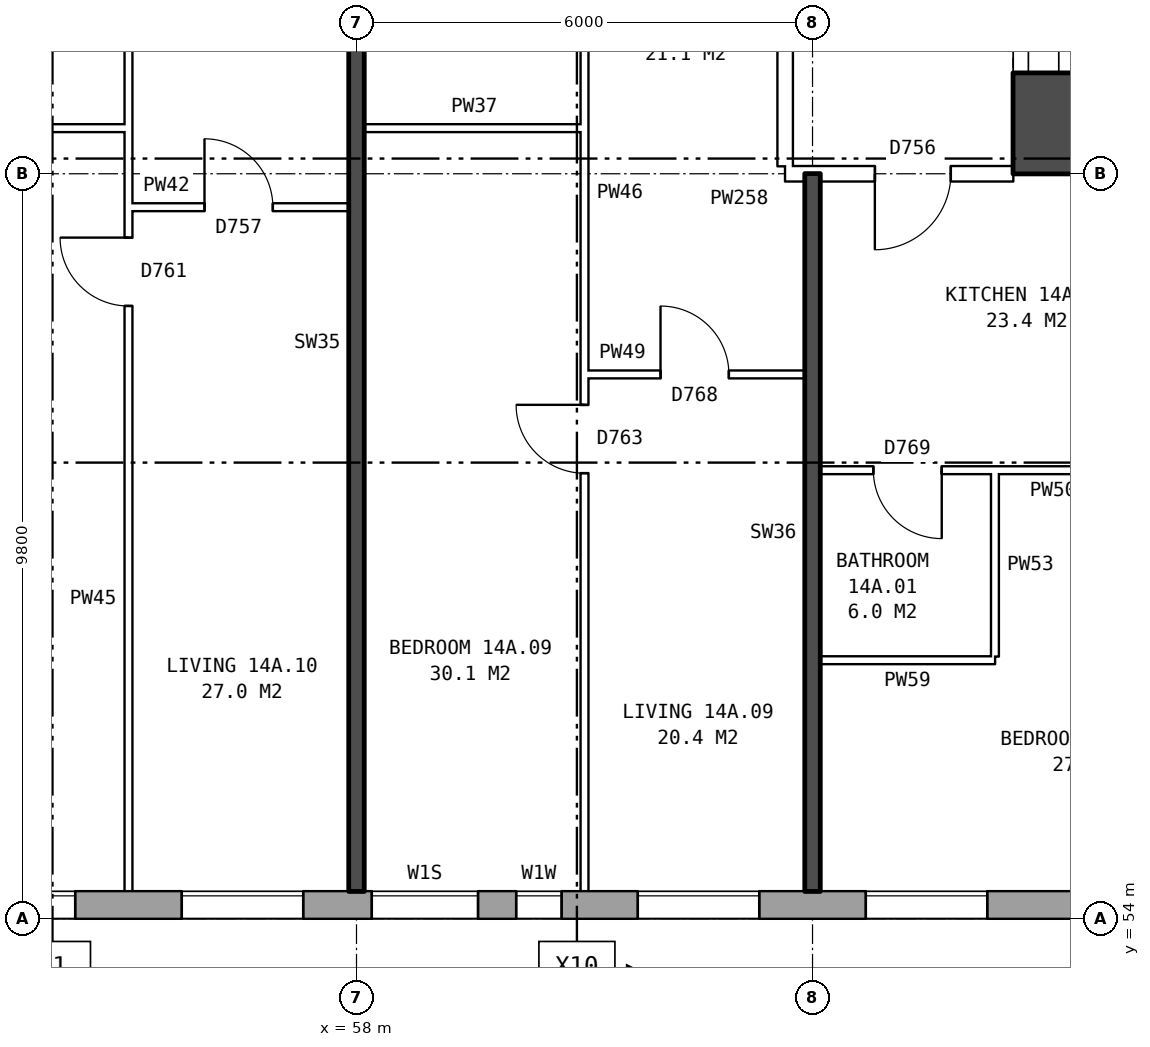
"""IFC4 building model, lengths in metres.
Left out: names, types, materials, properties, quantities, classifications, styles, units other than length and angle.
Written with IfcOpenShell. Run it as: python <this file> out.ifc"""

import sys

from ifc_helpers import new_model, si_unit, direction, frame, frame_2d, origin, place, context, subcontext, project, spatial, rectangle, extrude, element, fill, save


model = new_model("IFC4")
c1 = context("Model", 3, precision=1e-05, world=origin(), true_north=direction((0.0, 1.0)))
c2 = subcontext(c1, "Body", "Model", "MODEL_VIEW")
j1 = project(units=[si_unit("LENGTHUNIT", "METRE"), si_unit("PLANEANGLEUNIT", "RADIAN")], contexts=[c1])
p1 = place(None, origin())
s1 = spatial("IfcSite", under=j1, at=p1, CompositionType="ELEMENT")
p2 = place(p1, origin())
s2 = spatial("IfcBuilding", under=s1, at=p2, CompositionType="ELEMENT")
p3 = place(p2, frame((0.0, 0.0, 53.6)))
s3 = spatial("IfcBuildingStorey", under=s2, at=p3, CompositionType="ELEMENT", Elevation=53.6)
p4 = place(p3, frame((24.575, 54.18, 0.0), z_axis=(0.0, 0.0, 1.0), x_axis=(1.0, 0.0, 0.0)))
e1 = element("IfcWall", 1, at=p4, inside=s3, PredefinedType="STANDARD", context=c2, shape_type="SweptSolid", body=[
    extrude(rectangle(XDim=48.351, YDim=0.36, at=frame_2d((24.175, 0.0))), origin(), (0.0, 0.0, 1.0), 2.85),
])
p5 = place(p4, frame((1.125, 0.0, 0.8)))
e2 = element("IfcOpeningElement", 2, at=p5, cuts=e1, PredefinedType="OPENING", context=c2, shape_type="SweptSolid", body=[
    extrude(rectangle(XDim=1.6, YDim=1.8, at=frame_2d((0.8, 0.9))), frame((0.0, 0.19, 0.0), z_axis=(0.0, -1.0, 0.0), x_axis=(1.0, 0.0, 0.0)), (0.0, 0.0, 1.0), 0.38),
])
p6 = place(p4, frame((4.125, 0.0, 0.8)))
e3 = element("IfcOpeningElement", 3, at=p6, cuts=e1, PredefinedType="OPENING", context=c2, shape_type="SweptSolid", body=[
    extrude(rectangle(XDim=1.6, YDim=1.8, at=frame_2d((0.8, 0.9))), frame((0.0, 0.19, 0.0), z_axis=(0.0, -1.0, 0.0), x_axis=(1.0, 0.0, 0.0)), (0.0, 0.0, 1.0), 0.38),
])
p7 = place(p4, frame((7.125, 0.0, 0.8)))
e4 = element("IfcOpeningElement", 4, at=p7, cuts=e1, PredefinedType="OPENING", context=c2, shape_type="SweptSolid", body=[
    extrude(rectangle(XDim=1.6, YDim=1.8, at=frame_2d((0.8, 0.9))), frame((0.0, 0.19, 0.0), z_axis=(0.0, -1.0, 0.0), x_axis=(1.0, 0.0, 0.0)), (0.0, 0.0, 1.0), 0.38),
])
p8 = place(p4, frame((10.125, 0.0, 0.8)))
e5 = element("IfcOpeningElement", 5, at=p8, cuts=e1, PredefinedType="OPENING", context=c2, shape_type="SweptSolid", body=[
    extrude(rectangle(XDim=1.6, YDim=1.8, at=frame_2d((0.8, 0.9))), frame((0.0, 0.19, 0.0), z_axis=(0.0, -1.0, 0.0), x_axis=(1.0, 0.0, 0.0)), (0.0, 0.0, 1.0), 0.38),
])
p9 = place(p4, frame((12.025, 0.0, 1.7)))
e6 = element("IfcOpeningElement", 6, at=p9, cuts=e1, PredefinedType="OPENING", context=c2, shape_type="SweptSolid", body=[
    extrude(rectangle(XDim=0.8, YDim=0.9, at=frame_2d((0.4, 0.45))), frame((0.0, 0.19, 0.0), z_axis=(0.0, -1.0, 0.0), x_axis=(1.0, 0.0, 0.0)), (0.0, 0.0, 1.0), 0.38),
])
p10 = place(p4, frame((16.125, 0.0, 0.8)))
e7 = element("IfcOpeningElement", 7, at=p10, cuts=e1, PredefinedType="OPENING", context=c2, shape_type="SweptSolid", body=[
    extrude(rectangle(XDim=1.6, YDim=1.8, at=frame_2d((0.8, 0.9))), frame((0.0, 0.19, 0.0), z_axis=(0.0, -1.0, 0.0), x_axis=(1.0, 0.0, 0.0)), (0.0, 0.0, 1.0), 0.38),
])
p11 = place(p4, frame((19.125, 0.0, 0.8)))
e8 = element("IfcOpeningElement", 8, at=p11, cuts=e1, PredefinedType="OPENING", context=c2, shape_type="SweptSolid", body=[
    extrude(rectangle(XDim=1.6, YDim=1.8, at=frame_2d((0.8, 0.9))), frame((0.0, 0.19, 0.0), z_axis=(0.0, -1.0, 0.0), x_axis=(1.0, 0.0, 0.0)), (0.0, 0.0, 1.0), 0.38),
])
p12 = place(p4, frame((22.125, 0.0, 0.8)))
e9 = element("IfcOpeningElement", 9, at=p12, cuts=e1, PredefinedType="OPENING", context=c2, shape_type="SweptSolid", body=[
    extrude(rectangle(XDim=1.6, YDim=1.8, at=frame_2d((0.8, 0.9))), frame((0.0, 0.19, 0.0), z_axis=(0.0, -1.0, 0.0), x_axis=(1.0, 0.0, 0.0)), (0.0, 0.0, 1.0), 0.38),
])
p13 = place(p4, frame((25.125, 0.0, 0.8)))
e10 = element("IfcOpeningElement", 10, at=p13, cuts=e1, PredefinedType="OPENING", context=c2, shape_type="SweptSolid", body=[
    extrude(rectangle(XDim=1.6, YDim=1.8, at=frame_2d((0.8, 0.9))), frame((0.0, 0.19, 0.0), z_axis=(0.0, -1.0, 0.0), x_axis=(1.0, 0.0, 0.0)), (0.0, 0.0, 1.0), 0.38),
])
p14 = place(p4, frame((28.125, 0.0, 0.8)))
e11 = element("IfcOpeningElement", 11, at=p14, cuts=e1, PredefinedType="OPENING", context=c2, shape_type="SweptSolid", body=[
    extrude(rectangle(XDim=1.6, YDim=1.8, at=frame_2d((0.8, 0.9))), frame((0.0, 0.19, 0.0), z_axis=(0.0, -1.0, 0.0), x_axis=(1.0, 0.0, 0.0)), (0.0, 0.0, 1.0), 0.38),
])
p15 = place(p4, frame((31.125, 0.0, 0.8)))
e12 = element("IfcOpeningElement", 12, at=p15, cuts=e1, PredefinedType="OPENING", context=c2, shape_type="SweptSolid", body=[
    extrude(rectangle(XDim=1.6, YDim=1.8, at=frame_2d((0.8, 0.9))), frame((0.0, 0.19, 0.0), z_axis=(0.0, -1.0, 0.0), x_axis=(1.0, 0.0, 0.0)), (0.0, 0.0, 1.0), 0.38),
])
p16 = place(p4, frame((33.625, 0.0, 0.15)))
e13 = element("IfcOpeningElement", 13, at=p16, cuts=e1, PredefinedType="OPENING", context=c2, shape_type="SweptSolid", body=[
    extrude(rectangle(XDim=1.4, YDim=0.9, at=frame_2d((0.7, 0.45))), frame((0.0, 0.19, 0.0), z_axis=(0.0, -1.0, 0.0), x_axis=(1.0, 0.0, 0.0)), (0.0, 0.0, 1.0), 0.38),
])
p17 = place(p4, frame((37.125, 0.0, 0.8)))
e14 = element("IfcOpeningElement", 14, at=p17, cuts=e1, PredefinedType="OPENING", context=c2, shape_type="SweptSolid", body=[
    extrude(rectangle(XDim=1.6, YDim=1.8, at=frame_2d((0.8, 0.9))), frame((0.0, 0.19, 0.0), z_axis=(0.0, -1.0, 0.0), x_axis=(1.0, 0.0, 0.0)), (0.0, 0.0, 1.0), 0.38),
])
p18 = place(p4, frame((40.125, 0.0, 0.8)))
e15 = element("IfcOpeningElement", 15, at=p18, cuts=e1, PredefinedType="OPENING", context=c2, shape_type="SweptSolid", body=[
    extrude(rectangle(XDim=1.6, YDim=1.8, at=frame_2d((0.8, 0.9))), frame((0.0, 0.19, 0.0), z_axis=(0.0, -1.0, 0.0), x_axis=(1.0, 0.0, 0.0)), (0.0, 0.0, 1.0), 0.38),
])
p19 = place(p4, frame((43.125, 0.0, 0.8)))
e16 = element("IfcOpeningElement", 16, at=p19, cuts=e1, PredefinedType="OPENING", context=c2, shape_type="SweptSolid", body=[
    extrude(rectangle(XDim=1.6, YDim=1.8, at=frame_2d((0.8, 0.9))), frame((0.0, 0.19, 0.0), z_axis=(0.0, -1.0, 0.0), x_axis=(1.0, 0.0, 0.0)), (0.0, 0.0, 1.0), 0.38),
])
p20 = place(p4, frame((46.125, 0.0, 0.8)))
e17 = element("IfcOpeningElement", 17, at=p20, cuts=e1, PredefinedType="OPENING", context=c2, shape_type="SweptSolid", body=[
    extrude(rectangle(XDim=1.6, YDim=1.8, at=frame_2d((0.8, 0.9))), frame((0.0, 0.19, 0.0), z_axis=(0.0, -1.0, 0.0), x_axis=(1.0, 0.0, 0.0)), (0.0, 0.0, 1.0), 0.38),
])
p21 = place(p4, frame((14.325, 0.0, 0.8)))
e18 = element("IfcOpeningElement", 18, at=p21, cuts=e1, PredefinedType="OPENING", context=c2, shape_type="SweptSolid", body=[
    extrude(rectangle(XDim=0.8, YDim=0.9, at=frame_2d((0.4, 0.45))), frame((0.0, 0.19, 0.0), z_axis=(0.0, -1.0, 0.0), x_axis=(1.0, 0.0, 0.0)), (0.0, 0.0, 1.0), 0.38),
])
p22 = place(p4, frame((35.525, 0.0, 1.65)))
e19 = element("IfcOpeningElement", 19, at=p22, cuts=e1, PredefinedType="OPENING", context=c2, shape_type="SweptSolid", body=[
    extrude(rectangle(XDim=0.6, YDim=0.9, at=frame_2d((0.3, 0.45))), frame((0.0, 0.19, 0.0), z_axis=(0.0, -1.0, 0.0), x_axis=(1.0, 0.0, 0.0)), (0.0, 0.0, 1.0), 0.38),
])
p23 = place(p3, frame((67.04, 64.6, 0.0), z_axis=(0.0, 0.0, 1.0), x_axis=(0.0, 1.0, 0.0)))
e20 = element("IfcWall", 20, at=p23, inside=s3, PredefinedType="SHEAR", context=c2, shape_type="SweptSolid", body=[
    extrude(rectangle(XDim=10.8, YDim=0.8, at=frame_2d((5.4, 0.0))), origin(), (0.0, 0.0, 1.0), 2.85),
])
p24 = place(p23, frame((0.525, 0.0, 0.0)))
e21 = element("IfcOpeningElement", 21, at=p24, cuts=e20, PredefinedType="OPENING", context=c2, shape_type="SweptSolid", body=[
    extrude(rectangle(XDim=1.1, YDim=2.1, at=frame_2d((0.55, 1.05))), frame((0.0, 0.41, 0.0), z_axis=(0.0, -1.0, 0.0), x_axis=(1.0, 0.0, 0.0)), (0.0, 0.0, 1.0), 0.82),
])
p25 = place(p23, frame((9.1, 0.0, 0.0)))
e22 = element("IfcOpeningElement", 22, at=p25, cuts=e20, PredefinedType="OPENING", context=c2, shape_type="SweptSolid", body=[
    extrude(rectangle(XDim=1.1, YDim=2.1, at=frame_2d((0.55, 1.05))), frame((0.0, 0.41, 0.0), z_axis=(0.0, -1.0, 0.0), x_axis=(1.0, 0.0, 0.0)), (0.0, 0.0, 1.0), 0.82),
])
p26 = place(p3, frame((66.64, 64.2, 0.0), z_axis=(0.0, 0.0, 1.0), x_axis=(1.0, 0.0, 0.0)))
e23 = element("IfcWall", 23, at=p26, inside=s3, PredefinedType="SHEAR", context=c2, shape_type="SweptSolid", body=[
    extrude(rectangle(XDim=9.0, YDim=0.8, at=frame_2d((4.5, 0.0))), origin(), (0.0, 0.0, 1.0), 2.85),
])
p27 = place(p3, frame((63.64, 63.9, 0.0), z_axis=(0.0, 0.0, 1.0), x_axis=(0.0, 1.0, 0.0)))
e24 = element("IfcWall", 24, at=p27, inside=s3, PredefinedType="PARTITIONING", context=c2, shape_type="SweptSolid", body=[
    extrude(rectangle(XDim=12.2, YDim=0.2, at=frame_2d((6.1, 0.0))), origin(), (0.0, 0.0, 1.0), 2.85),
])
p28 = place(p27, frame((5.1, 0.0, 0.0)))
e25 = element("IfcOpeningElement", 25, at=p28, cuts=e24, PredefinedType="OPENING", context=c2, shape_type="SweptSolid", body=[
    extrude(rectangle(XDim=2.0, YDim=2.1, at=frame_2d((1.0, 1.05))), frame((0.0, 0.11, 0.0), z_axis=(0.0, -1.0, 0.0), x_axis=(1.0, 0.0, 0.0)), (0.0, 0.0, 1.0), 0.22),
])
p29 = place(p3, frame((64.1, 57.4, 0.0), z_axis=(0.0, 0.0, 1.0), x_axis=(1.0, 0.0, 0.0)))
e26 = element("IfcWall", 26, at=p29, inside=s3, PredefinedType="PARTITIONING", context=c2, shape_type="SweptSolid", body=[
    extrude(rectangle(XDim=2.3, YDim=0.1, at=frame_2d((1.15, 0.0))), origin(), (0.0, 0.0, 1.0), 2.85),
])
p30 = place(p3, frame((64.1, 59.9, 0.0), z_axis=(0.0, 0.0, 1.0), x_axis=(1.0, 0.0, 0.0)))
e27 = element("IfcWall", 27, at=p30, inside=s3, PredefinedType="PARTITIONING", context=c2, shape_type="SweptSolid", body=[
    extrude(rectangle(XDim=5.8, YDim=0.1, at=frame_2d((2.9, 0.0))), origin(), (0.0, 0.0, 1.0), 2.85),
])
p31 = place(p30, frame((3.6, 0.0, 0.0)))
e28 = element("IfcOpeningElement", 28, at=p31, cuts=e27, PredefinedType="OPENING", context=c2, shape_type="SweptSolid", body=[
    extrude(rectangle(XDim=0.9, YDim=2.1, at=frame_2d((0.45, 1.05))), frame((0.0, 0.06, 0.0), z_axis=(0.0, -1.0, 0.0), x_axis=(1.0, 0.0, 0.0)), (0.0, 0.0, 1.0), 0.12),
])
p32 = place(p30, frame((0.7, 0.0, 0.0)))
e29 = element("IfcOpeningElement", 29, at=p32, cuts=e27, PredefinedType="OPENING", context=c2, shape_type="SweptSolid", body=[
    extrude(rectangle(XDim=0.9, YDim=2.1, at=frame_2d((0.45, 1.05))), frame((0.0, 0.06, 0.0), z_axis=(0.0, -1.0, 0.0), x_axis=(1.0, 0.0, 0.0)), (0.0, 0.0, 1.0), 0.12),
])
p33 = place(p3, frame((61.0, 61.16, 0.0), z_axis=(0.0, 0.0, 1.0), x_axis=(1.0, 0.0, 0.0)))
e30 = element("IfcWall", 30, at=p33, inside=s3, PredefinedType="PARTITIONING", context=c2, shape_type="SweptSolid", body=[
    extrude(rectangle(XDim=2.9, YDim=0.1, at=frame_2d((1.45, 0.0))), origin(), (0.0, 0.0, 1.0), 2.85),
])
p34 = place(p33, frame((1.0, 0.0, 0.0)))
e31 = element("IfcOpeningElement", 31, at=p34, cuts=e30, PredefinedType="OPENING", context=c2, shape_type="SweptSolid", body=[
    extrude(rectangle(XDim=0.9, YDim=2.1, at=frame_2d((0.45, 1.05))), frame((0.0, 0.06, 0.0), z_axis=(0.0, -1.0, 0.0), x_axis=(1.0, 0.0, 0.0)), (0.0, 0.0, 1.0), 0.12),
])
p35 = place(p3, frame((55.0, 63.36, 0.0), z_axis=(0.0, 0.0, 1.0), x_axis=(1.0, 0.0, 0.0)))
e32 = element("IfcWall", 32, at=p35, inside=s3, PredefinedType="PARTITIONING", context=c2, shape_type="SweptSolid", body=[
    extrude(rectangle(XDim=2.9, YDim=0.1, at=frame_2d((1.45, 0.0))), origin(), (0.0, 0.0, 1.0), 2.85),
])
p36 = place(p35, frame((1.0, 0.0, 0.0)))
e33 = element("IfcOpeningElement", 33, at=p36, cuts=e32, PredefinedType="OPENING", context=c2, shape_type="SweptSolid", body=[
    extrude(rectangle(XDim=0.9, YDim=2.1, at=frame_2d((0.45, 1.05))), frame((0.0, 0.06, 0.0), z_axis=(0.0, -1.0, 0.0), x_axis=(1.0, 0.0, 0.0)), (0.0, 0.0, 1.0), 0.12),
])
p37 = place(p3, frame((63.64, 63.8, 0.0), z_axis=(0.0, 0.0, 1.0), x_axis=(1.0, 0.0, 0.0)))
e34 = element("IfcWall", 34, at=p37, inside=s3, PredefinedType="PARTITIONING", context=c2, shape_type="SweptSolid", body=[
    extrude(rectangle(XDim=3.0, YDim=0.2, at=frame_2d((1.5, 0.0))), origin(), (0.0, 0.0, 1.0), 2.85),
])
p38 = place(p37, frame((1.18, 0.0, 0.0)))
e35 = element("IfcOpeningElement", 35, at=p38, cuts=e34, PredefinedType="OPENING", context=c2, shape_type="SweptSolid", body=[
    extrude(rectangle(XDim=1.0, YDim=2.1, at=frame_2d((0.5, 1.05))), frame((0.0, 0.11, 0.0), z_axis=(0.0, -1.0, 0.0), x_axis=(1.0, 0.0, 0.0)), (0.0, 0.0, 1.0), 0.22),
])
for number, where, z_axis, x_axis in (
    (36, (52.1, 64.4, 0.0), (0.0, 0.0, 1.0), (1.0, 0.0, 0.0)),
    (37, (58.1, 64.4, 0.0), (0.0, 0.0, 1.0), (1.0, 0.0, 0.0)),
):
    element("IfcWall", number, at=place(p3, frame(where, z_axis=z_axis, x_axis=x_axis)), inside=s3, PredefinedType="PARTITIONING", context=c2, shape_type="SweptSolid", body=[
        extrude(rectangle(XDim=2.9, YDim=0.1, at=frame_2d((1.45, 0.0))), origin(), (0.0, 0.0, 1.0), 2.85),
    ])
p39 = place(p3, frame((55.0, 54.36, 0.0), z_axis=(0.0, 0.0, 1.0), x_axis=(0.0, 1.0, 0.0)))
e38 = element("IfcWall", 38, at=p39, inside=s3, PredefinedType="PARTITIONING", context=c2, shape_type="SweptSolid", body=[
    extrude(rectangle(XDim=14.34, YDim=0.1, at=frame_2d((7.17, 0.0))), origin(), (0.0, 0.0, 1.0), 2.85),
])
p40 = place(p39, frame((7.7, 0.0, 0.0)))
e39 = element("IfcOpeningElement", 39, at=p40, cuts=e38, PredefinedType="OPENING", context=c2, shape_type="SweptSolid", body=[
    extrude(rectangle(XDim=0.9, YDim=2.1, at=frame_2d((0.45, 1.05))), frame((0.0, 0.06, 0.0), z_axis=(0.0, -1.0, 0.0), x_axis=(1.0, 0.0, 0.0)), (0.0, 0.0, 1.0), 0.12),
])
p41 = place(p39, frame((13.04, 0.0, 0.0)))
e40 = element("IfcOpeningElement", 40, at=p41, cuts=e38, PredefinedType="OPENING", context=c2, shape_type="SweptSolid", body=[
    extrude(rectangle(XDim=0.9, YDim=2.1, at=frame_2d((0.45, 1.05))), frame((0.0, 0.06, 0.0), z_axis=(0.0, -1.0, 0.0), x_axis=(1.0, 0.0, 0.0)), (0.0, 0.0, 1.0), 0.12),
])
p42 = place(p3, frame((58.0, 54.36, 0.0), z_axis=(0.0, 0.0, 1.0), x_axis=(0.0, 1.0, 0.0)))
e41 = element("IfcWall", 41, at=p42, inside=s3, PredefinedType="SOLIDWALL", context=c2, shape_type="SweptSolid", body=[
    extrude(rectangle(XDim=14.44, YDim=0.2, at=frame_2d((7.22, 0.0))), origin(), (0.0, 0.0, 1.0), 2.85),
])
p43 = place(p3, frame((61.0, 54.36, 0.0), z_axis=(0.0, 0.0, 1.0), x_axis=(0.0, 1.0, 0.0)))
e42 = element("IfcWall", 42, at=p43, inside=s3, PredefinedType="PARTITIONING", context=c2, shape_type="SweptSolid", body=[
    extrude(rectangle(XDim=14.34, YDim=0.1, at=frame_2d((7.17, 0.0))), origin(), (0.0, 0.0, 1.0), 2.85),
])
p44 = place(p43, frame((5.5, 0.0, 0.0)))
e43 = element("IfcOpeningElement", 43, at=p44, cuts=e42, PredefinedType="OPENING", context=c2, shape_type="SweptSolid", body=[
    extrude(rectangle(XDim=0.9, YDim=2.1, at=frame_2d((0.45, 1.05))), frame((0.0, 0.06, 0.0), z_axis=(0.0, -1.0, 0.0), x_axis=(1.0, 0.0, 0.0)), (0.0, 0.0, 1.0), 0.12),
])
p45 = place(p43, frame((12.54, 0.0, 0.0)))
e44 = element("IfcOpeningElement", 44, at=p45, cuts=e42, PredefinedType="OPENING", context=c2, shape_type="SweptSolid", body=[
    extrude(rectangle(XDim=0.9, YDim=2.1, at=frame_2d((0.45, 1.05))), frame((0.0, 0.06, 0.0), z_axis=(0.0, -1.0, 0.0), x_axis=(1.0, 0.0, 0.0)), (0.0, 0.0, 1.0), 0.12),
])
p46 = place(p3, frame((64.0, 54.36, 0.0), z_axis=(0.0, 0.0, 1.0), x_axis=(0.0, 1.0, 0.0)))
e45 = element("IfcWall", 45, at=p46, inside=s3, PredefinedType="SOLIDWALL", context=c2, shape_type="SweptSolid", body=[
    extrude(rectangle(XDim=9.44, YDim=0.2, at=frame_2d((4.72, 0.0))), origin(), (0.0, 0.0, 1.0), 2.85),
])
p47 = place(p3, frame((66.4, 57.45, 0.0), z_axis=(0.0, 0.0, 1.0), x_axis=(0.0, 1.0, 0.0)))
e46 = element("IfcWall", 46, at=p47, inside=s3, PredefinedType="PARTITIONING", context=c2, shape_type="SweptSolid", body=[
    extrude(rectangle(XDim=2.4, YDim=0.1, at=frame_2d((1.2, 0.0))), origin(), (0.0, 0.0, 1.0), 2.85),
])
p48 = place(p14, origin())
e47 = element("IfcWindow", 47, at=p48, inside=s3, PartitioningType="SINGLE_PANEL", PredefinedType="WINDOW", context=c2, shape_type="SweptSolid", body=[
    extrude(rectangle(XDim=1.6, YDim=1.8, at=frame_2d((0.8, 0.9))), frame((0.0, 0.15, 0.0), z_axis=(0.0, -1.0, 0.0), x_axis=(1.0, 0.0, 0.0)), (0.0, 0.0, 1.0), 0.06),
])
fill(e11, e47)
p49 = place(p15, origin())
e48 = element("IfcWindow", 48, at=p49, inside=s3, PartitioningType="SINGLE_PANEL", PredefinedType="WINDOW", context=c2, shape_type="SweptSolid", body=[
    extrude(rectangle(XDim=1.6, YDim=1.8, at=frame_2d((0.8, 0.9))), frame((0.0, 0.15, 0.0), z_axis=(0.0, -1.0, 0.0), x_axis=(1.0, 0.0, 0.0)), (0.0, 0.0, 1.0), 0.06),
])
fill(e12, e48)
p50 = place(p16, origin())
e49 = element("IfcWindow", 49, at=p50, inside=s3, PartitioningType="SINGLE_PANEL", PredefinedType="WINDOW", context=c2, shape_type="SweptSolid", body=[
    extrude(rectangle(XDim=1.4, YDim=0.9, at=frame_2d((0.7, 0.45))), frame((0.0, 0.15, 0.0), z_axis=(0.0, -1.0, 0.0), x_axis=(1.0, 0.0, 0.0)), (0.0, 0.0, 1.0), 0.06),
])
fill(e13, e49)
p51 = place(p17, origin())
e50 = element("IfcWindow", 50, at=p51, inside=s3, PartitioningType="SINGLE_PANEL", PredefinedType="WINDOW", context=c2, shape_type="SweptSolid", body=[
    extrude(rectangle(XDim=1.6, YDim=1.8, at=frame_2d((0.8, 0.9))), frame((0.0, 0.15, 0.0), z_axis=(0.0, -1.0, 0.0), x_axis=(1.0, 0.0, 0.0)), (0.0, 0.0, 1.0), 0.06),
])
fill(e14, e50)
p52 = place(p18, origin())
e51 = element("IfcWindow", 51, at=p52, inside=s3, PartitioningType="SINGLE_PANEL", PredefinedType="WINDOW", context=c2, shape_type="SweptSolid", body=[
    extrude(rectangle(XDim=1.6, YDim=1.8, at=frame_2d((0.8, 0.9))), frame((0.0, 0.15, 0.0), z_axis=(0.0, -1.0, 0.0), x_axis=(1.0, 0.0, 0.0)), (0.0, 0.0, 1.0), 0.06),
])
fill(e15, e51)
p53 = place(p24, origin())
e52 = element("IfcDoor", 52, at=p53, inside=s3, OperationType="DOUBLE_DOOR_SLIDING", PredefinedType="DOOR", context=c2, shape_type="SweptSolid", body=[
    extrude(rectangle(XDim=1.1, YDim=2.1, at=frame_2d((0.55, 1.05))), frame((0.0, -0.335, 0.0), z_axis=(0.0, -1.0, 0.0), x_axis=(1.0, 0.0, 0.0)), (0.0, 0.0, 1.0), 0.05),
])
fill(e21, e52)
p54 = place(p38, frame((1.0, 0.0, 0.0), z_axis=(0.0, 0.0, 1.0), x_axis=(-1.0, 0.0, 0.0)))
e53 = element("IfcDoor", 53, at=p54, inside=s3, OperationType="SINGLE_SWING_RIGHT", PredefinedType="DOOR", context=c2, shape_type="SweptSolid", body=[
    extrude(rectangle(XDim=1.0, YDim=2.1, at=frame_2d((0.5, 1.05))), frame((0.0, 0.025, 0.0), z_axis=(0.0, -1.0, 0.0), x_axis=(1.0, 0.0, 0.0)), (0.0, 0.0, 1.0), 0.05),
])
fill(e35, e53)
p55 = place(p32, frame((0.9, 0.0, 0.0), z_axis=(0.0, 0.0, 1.0), x_axis=(-1.0, 0.0, 0.0)))
e54 = element("IfcDoor", 54, at=p55, inside=s3, OperationType="SINGLE_SWING_LEFT", PredefinedType="DOOR", context=c2, shape_type="SweptSolid", body=[
    extrude(rectangle(XDim=0.9, YDim=2.1, at=frame_2d((0.45, 1.05))), frame((0.0, 0.025, 0.0), z_axis=(0.0, -1.0, 0.0), x_axis=(1.0, 0.0, 0.0)), (0.0, 0.0, 1.0), 0.05),
])
fill(e29, e54)
p56 = place(p44, origin())
e55 = element("IfcDoor", 55, at=p56, inside=s3, OperationType="SINGLE_SWING_RIGHT", PredefinedType="DOOR", context=c2, shape_type="SweptSolid", body=[
    extrude(rectangle(XDim=0.9, YDim=2.1, at=frame_2d((0.45, 1.05))), frame((0.0, 0.025, 0.0), z_axis=(0.0, -1.0, 0.0), x_axis=(1.0, 0.0, 0.0)), (0.0, 0.0, 1.0), 0.05),
])
fill(e43, e55)
p57 = place(p34, origin())
e56 = element("IfcDoor", 56, at=p57, inside=s3, OperationType="SINGLE_SWING_LEFT", PredefinedType="DOOR", context=c2, shape_type="SweptSolid", body=[
    extrude(rectangle(XDim=0.9, YDim=2.1, at=frame_2d((0.45, 1.05))), frame((0.0, 0.025, 0.0), z_axis=(0.0, -1.0, 0.0), x_axis=(1.0, 0.0, 0.0)), (0.0, 0.0, 1.0), 0.05),
])
fill(e31, e56)
p58 = place(p40, origin())
e57 = element("IfcDoor", 57, at=p58, inside=s3, OperationType="SINGLE_SWING_RIGHT", PredefinedType="DOOR", context=c2, shape_type="SweptSolid", body=[
    extrude(rectangle(XDim=0.9, YDim=2.1, at=frame_2d((0.45, 1.05))), frame((0.0, 0.025, 0.0), z_axis=(0.0, -1.0, 0.0), x_axis=(1.0, 0.0, 0.0)), (0.0, 0.0, 1.0), 0.05),
])
fill(e39, e57)
p59 = place(p36, origin())
e58 = element("IfcDoor", 58, at=p59, inside=s3, OperationType="SINGLE_SWING_LEFT", PredefinedType="DOOR", context=c2, shape_type="SweptSolid", body=[
    extrude(rectangle(XDim=0.9, YDim=2.1, at=frame_2d((0.45, 1.05))), frame((0.0, 0.025, 0.0), z_axis=(0.0, -1.0, 0.0), x_axis=(1.0, 0.0, 0.0)), (0.0, 0.0, 1.0), 0.05),
])
fill(e33, e58)
p60 = place(p22, origin())
e59 = element("IfcWindow", 59, at=p60, inside=s3, PartitioningType="SINGLE_PANEL", PredefinedType="WINDOW", context=c2, shape_type="SweptSolid", body=[
    extrude(rectangle(XDim=0.6, YDim=0.9, at=frame_2d((0.3, 0.45))), frame((0.0, 0.15, 0.0), z_axis=(0.0, -1.0, 0.0), x_axis=(1.0, 0.0, 0.0)), (0.0, 0.0, 1.0), 0.06),
])
fill(e19, e59)
save(model, sys.argv[1])
